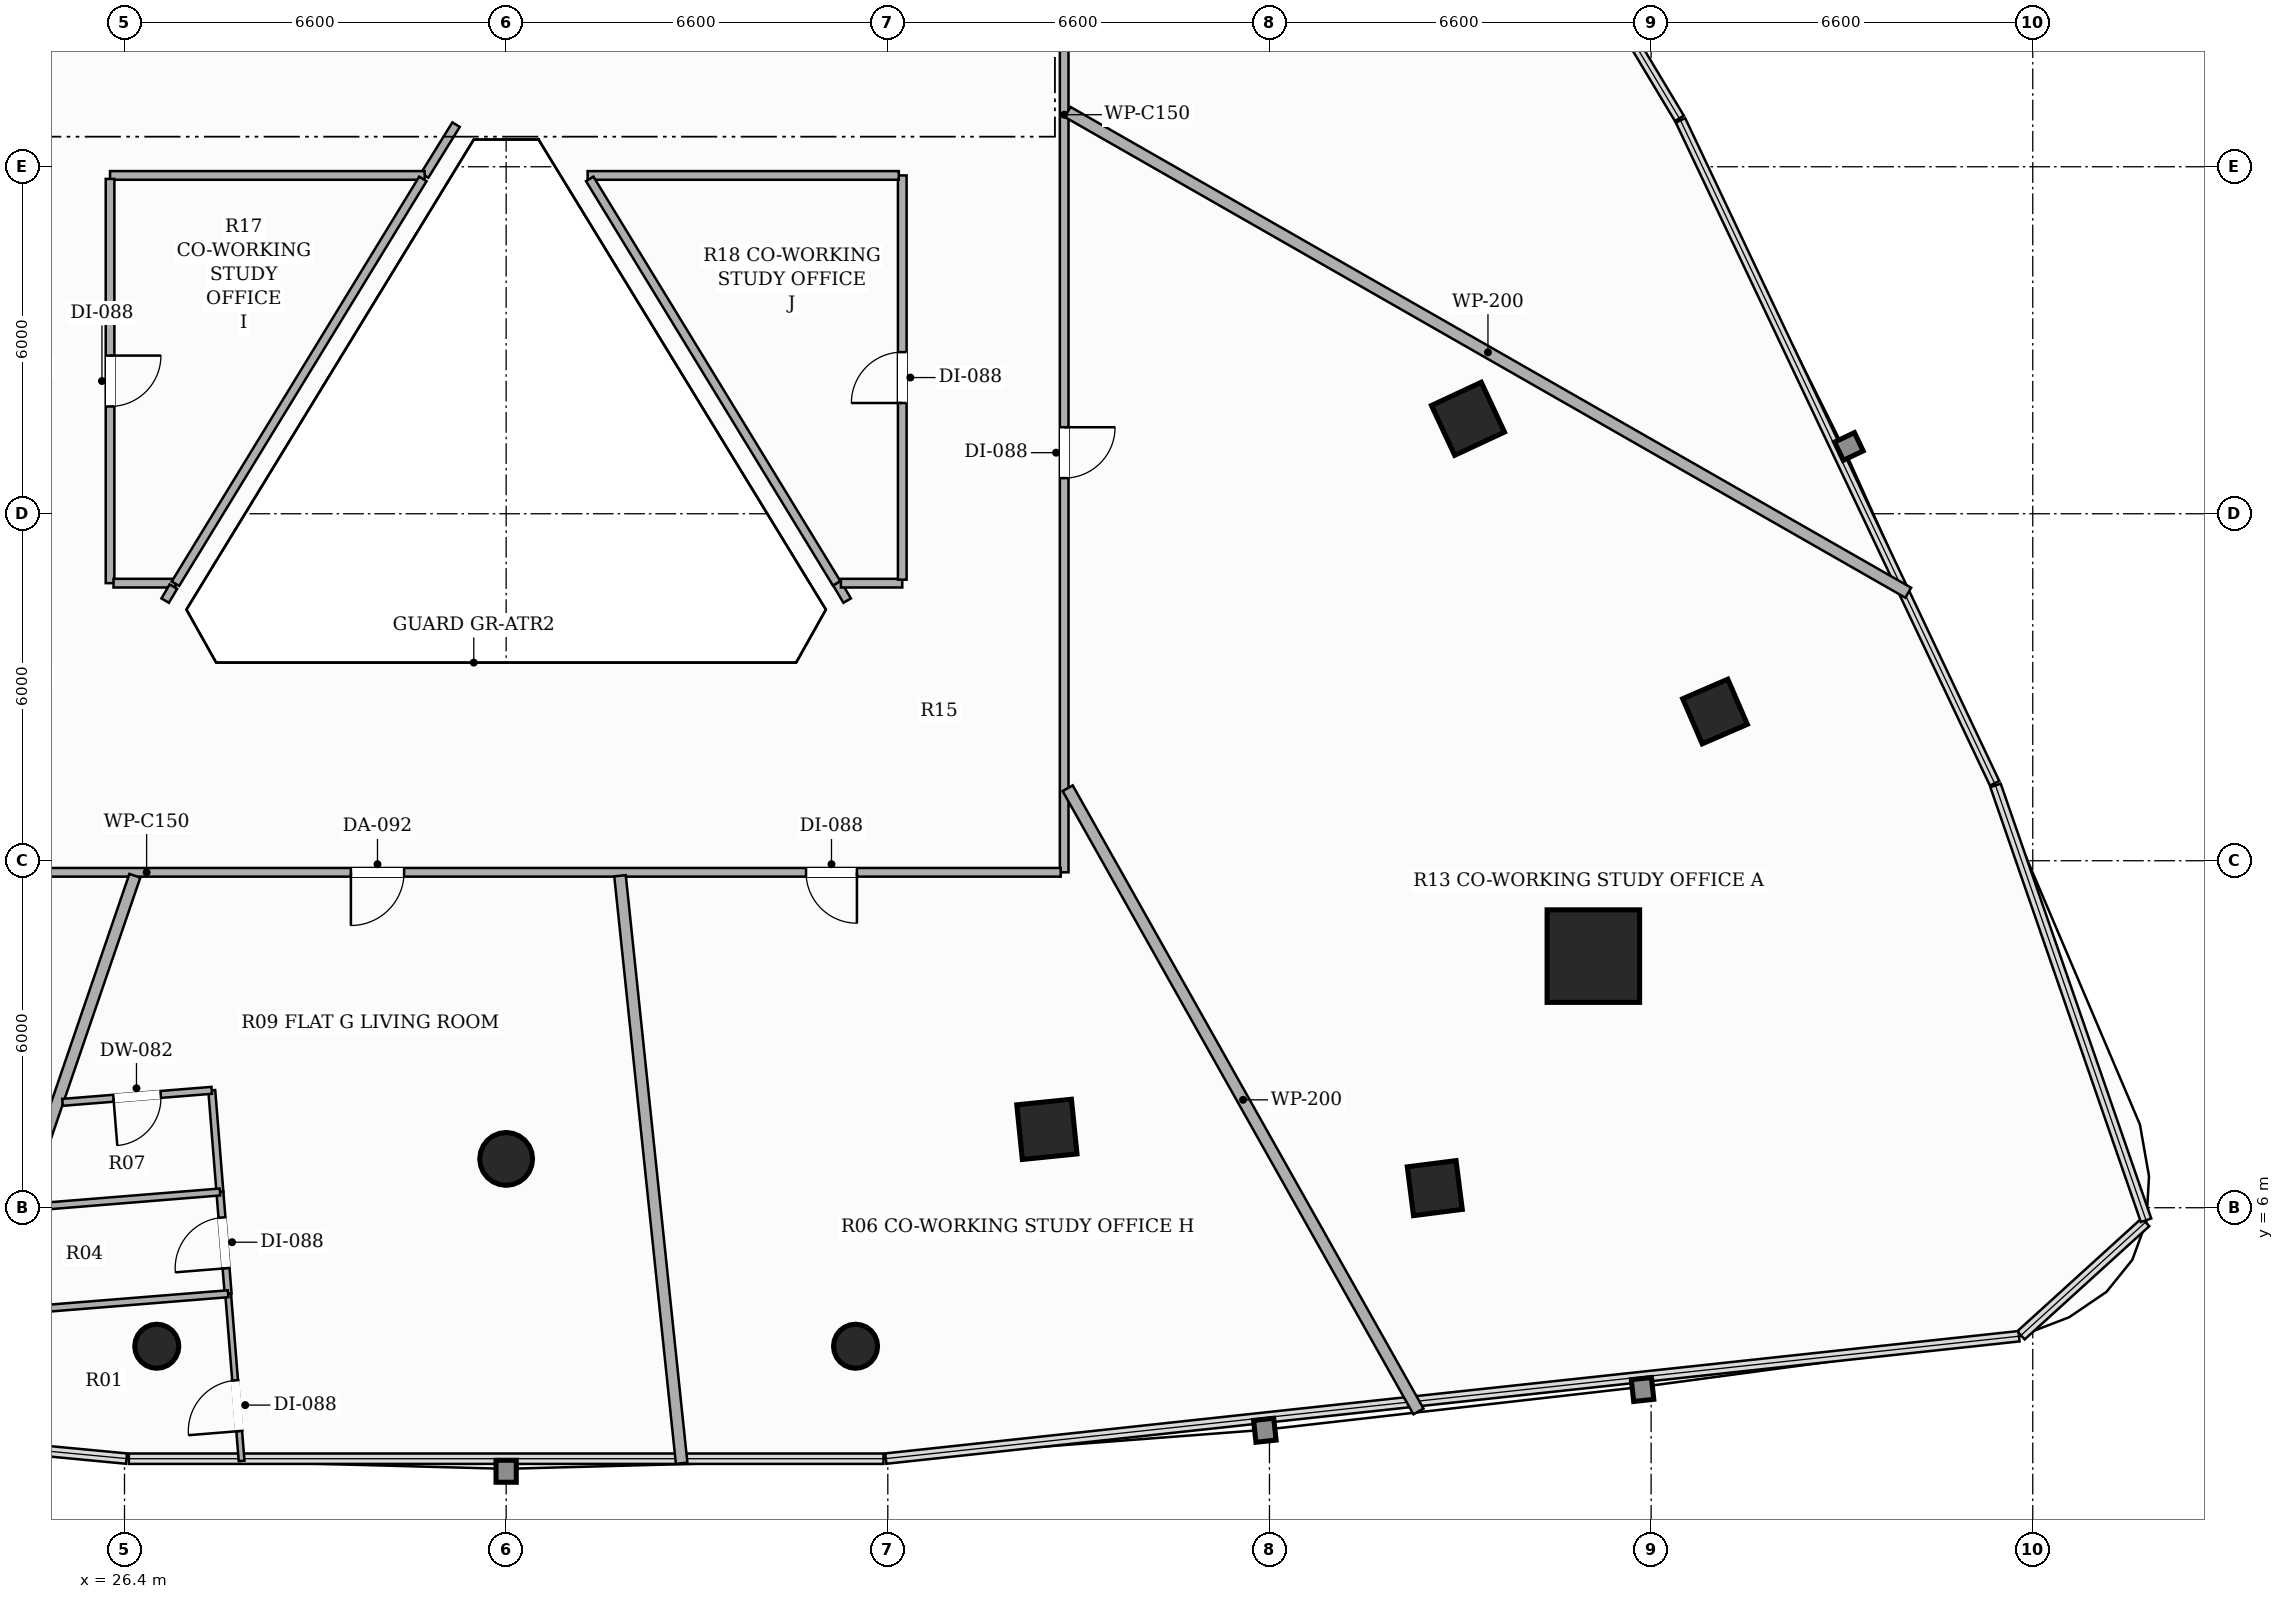
"""IFC4 building model, lengths in metres.
Left out: names, types, materials, properties, quantities, classifications, styles, units other than length and angle.
Written with IfcOpenShell. Run it as: python <this file> out.ifc"""

import sys

from ifc_helpers import new_model, si_unit, direction, frame, frame_2d, origin, origin_2d, place, context, subcontext, project, spatial, rectangle, hollow_rectangle, hollow_circle, extrude, element, fill, save


model = new_model("IFC4")
c1 = context("Model", 3, precision=1e-05, world=origin(), true_north=direction((0.0, 1.0)))
c2 = subcontext(c1, "Body", "Model", "MODEL_VIEW")
j1 = project(units=[si_unit("LENGTHUNIT", "METRE"), si_unit("PLANEANGLEUNIT", "RADIAN")], contexts=[c1])
p1 = place(None, origin())
s1 = spatial("IfcSite", under=j1, at=p1, CompositionType="ELEMENT")
p2 = place(p1, origin())
s2 = spatial("IfcBuilding", under=s1, at=p2, CompositionType="ELEMENT")
p3 = place(p2, frame((0.0, 0.0, 53.3)))
s3 = spatial("IfcBuildingStorey", under=s2, at=p3, CompositionType="ELEMENT", Elevation=53.3)
p4 = place(p3, frame((51.801, 10.351, 0.0), z_axis=(0.0, 0.0, 1.0), x_axis=(1.0, 0.0, 0.0)))
e1 = element("IfcColumn", 1, at=p4, inside=s3, PredefinedType="COLUMN", context=c2, shape_type="SweptSolid", body=[
    extrude(hollow_rectangle(XDim=1.6, YDim=1.6, WallThickness=0.05, at=origin_2d()), origin(), (0.0, 0.0, 1.0), 3.3),
])
p5 = place(p3, frame((33.0, 6.844, 0.0), z_axis=(0.0, 0.0, 1.0), x_axis=(1.0, 0.0, 0.0)))
e2 = element("IfcColumn", 2, at=p5, inside=s3, PredefinedType="COLUMN", context=c2, shape_type="SweptSolid", body=[
    extrude(hollow_circle(Radius=0.457, WallThickness=0.025, at=origin_2d()), origin(), (0.0, 0.0, 1.0), 3.3),
])
for number, where, z_axis, x_axis in (
    (3, (42.351, 7.355, 0.0), (0.0, 0.0, 1.0), (0.995, 0.101, 0.0)),
    (4, (49.633, 19.642, 0.0), (0.0, 0.0, 1.0), (-0.423, 0.906, 0.0)),
):
    element("IfcColumn", number, at=place(p3, frame(where, z_axis=z_axis, x_axis=x_axis)), inside=s3, PredefinedType="COLUMN", context=c2, shape_type="SweptSolid", body=[
        extrude(hollow_rectangle(XDim=0.95, YDim=0.95, WallThickness=0.032, at=origin_2d()), origin(), (0.0, 0.0, 1.0), 3.3),
    ])
for number, where, z_axis, x_axis in (
    (5, (49.059, 6.339, 0.0), (0.0, 0.0, 1.0), (0.992, 0.127, 0.0)),
    (6, (53.905, 14.58, 0.0), (0.0, 0.0, 1.0), (-0.397, 0.918, 0.0)),
):
    element("IfcColumn", number, at=place(p3, frame(where, z_axis=z_axis, x_axis=x_axis)), inside=s3, PredefinedType="COLUMN", context=c2, shape_type="SweptSolid", body=[
        extrude(hollow_rectangle(XDim=0.85, YDim=0.85, WallThickness=0.028, at=origin_2d()), origin(), (0.0, 0.0, 1.0), 3.3),
    ])
for number, where, z_axis, x_axis in (
    (7, (26.958, 3.605, 0.0), (0.0, 0.0, 1.0), (1.0, 0.0, 0.0)),
    (8, (39.042, 3.605, 0.0), (0.0, 0.0, 1.0), (1.0, 0.0, 0.0)),
):
    element("IfcColumn", number, at=place(p3, frame(where, z_axis=z_axis, x_axis=x_axis)), inside=s3, PredefinedType="COLUMN", context=c2, shape_type="SweptSolid", body=[
        extrude(hollow_circle(Radius=0.381, WallThickness=0.022, at=origin_2d()), origin(), (0.0, 0.0, 1.0), 3.3),
    ])
p6 = place(p3, frame((42.65, 36.84, 0.0), z_axis=(0.0, 0.0, 1.0), x_axis=(0.0, -1.0, 0.0)))
e9 = element("IfcWall", 9, at=p6, inside=s3, PredefinedType="PARTITIONING", context=c2, shape_type="SweptSolid", body=[
    extrude(rectangle(XDim=25.04, YDim=0.15, at=frame_2d((12.52, 0.0))), origin(), (0.0, 0.0, 1.0), 2.413),
])
p7 = place(p6, frame((17.344, 0.0, 0.0)))
e10 = element("IfcOpeningElement", 10, at=p7, cuts=e9, PredefinedType="OPENING", context=c2, shape_type="SweptSolid", body=[
    extrude(rectangle(XDim=0.88, YDim=2.1, at=frame_2d((0.44, 1.05))), frame((0.0, 0.085, 0.0), z_axis=(0.0, -1.0, 0.0), x_axis=(1.0, 0.0, 0.0)), (0.0, 0.0, 1.0), 0.17),
])
p8 = place(p6, frame((5.656, 0.0, 0.0)))
e11 = element("IfcOpeningElement", 11, at=p8, cuts=e9, PredefinedType="OPENING", context=c2, shape_type="SweptSolid", body=[
    extrude(rectangle(XDim=0.88, YDim=2.1, at=frame_2d((0.44, 1.05))), frame((0.0, 0.085, 0.0), z_axis=(0.0, -1.0, 0.0), x_axis=(1.0, 0.0, 0.0)), (0.0, 0.0, 1.0), 0.17),
])
p9 = place(p3, frame((42.59, 11.8, 0.0), z_axis=(0.0, 0.0, 1.0), x_axis=(-1.0, 0.0, 0.0)))
e12 = element("IfcWall", 12, at=p9, inside=s3, PredefinedType="PARTITIONING", context=c2, shape_type="SweptSolid", body=[
    extrude(rectangle(XDim=19.24, YDim=0.15, at=frame_2d((9.62, 0.0))), origin(), (0.0, 0.0, 1.0), 2.669),
])
p10 = place(p9, frame((11.355, 0.0, 0.0)))
e13 = element("IfcOpeningElement", 13, at=p10, cuts=e12, PredefinedType="OPENING", context=c2, shape_type="SweptSolid", body=[
    extrude(rectangle(XDim=0.92, YDim=2.15, at=frame_2d((0.46, 1.075))), frame((0.0, 0.085, 0.0), z_axis=(0.0, -1.0, 0.0), x_axis=(1.0, 0.0, 0.0)), (0.0, 0.0, 1.0), 0.17),
])
p11 = place(p9, frame((3.524, 0.0, 0.0)))
e14 = element("IfcOpeningElement", 14, at=p11, cuts=e12, PredefinedType="OPENING", context=c2, shape_type="SweptSolid", body=[
    extrude(rectangle(XDim=0.88, YDim=2.1, at=frame_2d((0.44, 1.05))), frame((0.0, 0.085, 0.0), z_axis=(0.0, -1.0, 0.0), x_axis=(1.0, 0.0, 0.0)), (0.0, 0.0, 1.0), 0.17),
])
p12 = place(p3, frame((32.134, 24.728, 0.0), z_axis=(0.0, 0.0, 1.0), x_axis=(-0.525996314714, -0.850486846993, 0.0)))
e15 = element("IfcWall", 15, at=p12, inside=s3, PredefinedType="PARTITIONING", context=c2, shape_type="SweptSolid", body=[
    extrude(rectangle(XDim=1.032, YDim=0.15, at=frame_2d((0.516, 0.0))), origin(), (0.0, 0.0, 1.0), 3.06),
])
p13 = place(p3, frame((31.591, 23.85, 0.0), z_axis=(0.0, 0.0, 1.0), x_axis=(-1.0, 0.0, 0.0)))
e16 = element("IfcWall", 16, at=p13, inside=s3, PredefinedType="PARTITIONING", context=c2, shape_type="SweptSolid", body=[
    extrude(rectangle(XDim=5.441, YDim=0.15, at=frame_2d((2.721, 0.0))), origin(), (0.0, 0.0, 1.0), 2.669),
])
p14 = place(p3, frame((26.15, 23.79, 0.0), z_axis=(0.0, 0.0, 1.0), x_axis=(0.0, -1.0, 0.0)))
e17 = element("IfcWall", 17, at=p14, inside=s3, PredefinedType="PARTITIONING", context=c2, shape_type="SweptSolid", body=[
    extrude(rectangle(XDim=6.99, YDim=0.15, at=frame_2d((3.495, 0.0))), origin(), (0.0, 0.0, 1.0), 2.669),
])
p15 = place(p14, frame((3.055, 0.0, 0.0)))
e18 = element("IfcOpeningElement", 18, at=p15, cuts=e17, PredefinedType="OPENING", context=c2, shape_type="SweptSolid", body=[
    extrude(rectangle(XDim=0.88, YDim=2.1, at=frame_2d((0.44, 1.05))), frame((0.0, 0.085, 0.0), z_axis=(0.0, -1.0, 0.0), x_axis=(1.0, 0.0, 0.0)), (0.0, 0.0, 1.0), 0.17),
])
p16 = place(p3, frame((26.21, 16.8, 0.0), z_axis=(0.0, 0.0, 1.0), x_axis=(1.0, 0.0, 0.0)))
e19 = element("IfcWall", 19, at=p16, inside=s3, PredefinedType="PARTITIONING", context=c2, shape_type="SweptSolid", body=[
    extrude(rectangle(XDim=1.071, YDim=0.15, at=frame_2d((0.536, 0.0))), origin(), (0.0, 0.0, 1.0), 3.06),
])
p17 = place(p3, frame((27.246, 16.74, 0.0), z_axis=(0.0, 0.0, 1.0), x_axis=(-0.508992658084, -0.860770860344, 0.0)))
e20 = element("IfcWall", 20, at=p17, inside=s3, PredefinedType="PARTITIONING", context=c2, shape_type="SweptSolid", body=[
    extrude(rectangle(XDim=0.281, YDim=0.15, at=frame_2d((0.141, 0.0))), origin(), (0.0, 0.0, 1.0), 3.06),
])
p18 = place(p3, frame((38.897, 16.498, 0.0), z_axis=(0.0, 0.0, 1.0), x_axis=(-0.507720001023, 0.861522141654, 0.0)))
e21 = element("IfcWall", 21, at=p18, inside=s3, PredefinedType="PARTITIONING", context=c2, shape_type="SweptSolid", body=[
    extrude(rectangle(XDim=0.351, YDim=0.15, at=frame_2d((0.175, 0.0))), origin(), (0.0, 0.0, 1.0), 3.06),
])
p19 = place(p3, frame((38.789, 16.8, 0.0), z_axis=(0.0, 0.0, 1.0), x_axis=(1.0, 0.0, 0.0)))
e22 = element("IfcWall", 22, at=p19, inside=s3, PredefinedType="PARTITIONING", context=c2, shape_type="SweptSolid", body=[
    extrude(rectangle(XDim=1.061, YDim=0.15, at=frame_2d((0.531, 0.0))), origin(), (0.0, 0.0, 1.0), 3.06),
])
p20 = place(p3, frame((39.85, 16.86, 0.0), z_axis=(0.0, 0.0, 1.0), x_axis=(0.0, 1.0, 0.0)))
e23 = element("IfcWall", 23, at=p20, inside=s3, PredefinedType="PARTITIONING", context=c2, shape_type="SweptSolid", body=[
    extrude(rectangle(XDim=6.99, YDim=0.15, at=frame_2d((3.495, 0.0))), origin(), (0.0, 0.0, 1.0), 2.669),
])
p21 = place(p20, frame((3.055, 0.0, 0.0)))
e24 = element("IfcOpeningElement", 24, at=p21, cuts=e23, PredefinedType="OPENING", context=c2, shape_type="SweptSolid", body=[
    extrude(rectangle(XDim=0.88, YDim=2.1, at=frame_2d((0.44, 1.05))), frame((0.0, 0.085, 0.0), z_axis=(0.0, -1.0, 0.0), x_axis=(1.0, 0.0, 0.0)), (0.0, 0.0, 1.0), 0.17),
])
p22 = place(p3, frame((39.79, 23.85, 0.0), z_axis=(0.0, 0.0, 1.0), x_axis=(-1.0, 0.0, 0.0)))
e25 = element("IfcWall", 25, at=p22, inside=s3, PredefinedType="PARTITIONING", context=c2, shape_type="SweptSolid", body=[
    extrude(rectangle(XDim=5.381, YDim=0.15, at=frame_2d((2.69, 0.0))), origin(), (0.0, 0.0, 1.0), 2.669),
])
p23 = place(p3, frame((27.281, 16.79, 0.0), z_axis=(0.0, 0.0, 1.0), x_axis=(0.521563150989, 0.8532126813, 0.0)))
e26 = element("IfcWall", 26, at=p23, inside=s3, PredefinedType="PARTITIONING", context=c2, shape_type="SweptSolid", body=[
    extrude(rectangle(XDim=8.204, YDim=0.15, at=frame_2d((4.102, 0.0))), origin(), (0.0, 0.0, 1.0), 2.669),
])
p24 = place(p3, frame((34.445, 23.79, 0.0), z_axis=(0.0, 0.0, 1.0), x_axis=(0.521145044988, -0.853468125992, 0.0)))
e27 = element("IfcWall", 27, at=p24, inside=s3, PredefinedType="PARTITIONING", context=c2, shape_type="SweptSolid", body=[
    extrude(rectangle(XDim=8.194, YDim=0.15, at=frame_2d((4.097, 0.0))), origin(), (0.0, 0.0, 1.0), 2.669),
])
p25 = place(p3, frame((42.71, 24.947, 0.0), z_axis=(0.0, 0.0, 1.0), x_axis=(0.868086992596, -0.49641210026, 0.0)))
e28 = element("IfcWall", 28, at=p25, inside=s3, PredefinedType="PARTITIONING", context=c2, shape_type="SweptSolid", body=[
    extrude(rectangle(XDim=16.746, YDim=0.2, at=frame_2d((8.373, 0.0))), origin(), (0.0, 0.0, 1.0), 2.413),
])
p26 = place(p3, frame((48.777, 2.477, 0.0), z_axis=(0.0, 0.0, 1.0), x_axis=(-0.490577996894, 0.871397285377, 0.0)))
e29 = element("IfcWall", 29, at=p26, inside=s3, PredefinedType="PARTITIONING", context=c2, shape_type="SweptSolid", body=[
    extrude(rectangle(XDim=12.367, YDim=0.2, at=frame_2d((6.184, 0.0))), origin(), (0.0, 0.0, 1.0), 2.413),
])
p27 = place(p3, frame((26.579, 11.74, 0.0), z_axis=(0.0, 0.0, 1.0), x_axis=(-0.32385337678, -0.946107282684, 0.0)))
e30 = element("IfcWall", 30, at=p27, inside=s3, PredefinedType="PARTITIONING", context=c2, shape_type="SweptSolid", body=[
    extrude(rectangle(XDim=10.378, YDim=0.2, at=frame_2d((5.189, 0.0))), origin(), (0.0, 0.0, 1.0), 2.413),
])
p28 = place(p3, frame((34.969, 11.74, 0.0), z_axis=(0.0, 0.0, 1.0), x_axis=(0.10435134466, -0.994540495338, 0.0)))
e31 = element("IfcWall", 31, at=p28, inside=s3, PredefinedType="PARTITIONING", context=c2, shape_type="SweptSolid", body=[
    extrude(rectangle(XDim=10.215, YDim=0.2, at=frame_2d((5.107, 0.0))), origin(), (0.0, 0.0, 1.0), 2.413),
])
p29 = place(p3, frame((28.05, 6.272, 0.0), z_axis=(0.0, 0.0, 1.0), x_axis=(-0.080009304194, 0.996794116778, 0.0)))
e32 = element("IfcWall", 32, at=p29, inside=s3, PredefinedType="PARTITIONING", context=c2, shape_type="SweptSolid", body=[
    extrude(rectangle(XDim=1.764, YDim=0.12, at=frame_2d((0.882, 0.0))), origin(), (0.0, 0.0, 1.0), 3.06),
])
p30 = place(p3, frame((27.909, 8.03, 0.0), z_axis=(0.0, 0.0, 1.0), x_axis=(-0.996768339954, -0.080329798112, 0.0)))
e33 = element("IfcWall", 33, at=p30, inside=s3, PredefinedType="PARTITIONING", context=c2, shape_type="SweptSolid", body=[
    extrude(rectangle(XDim=2.589, YDim=0.12, at=frame_2d((1.295, 0.0))), origin(), (0.0, 0.0, 1.0), 3.06),
])
p31 = place(p30, frame((0.885, 0.0, 0.0)))
e34 = element("IfcOpeningElement", 34, at=p31, cuts=e33, PredefinedType="OPENING", context=c2, shape_type="SweptSolid", body=[
    extrude(rectangle(XDim=0.82, YDim=2.1, at=frame_2d((0.41, 1.05))), frame((0.0, 0.07, 0.0), z_axis=(0.0, -1.0, 0.0), x_axis=(1.0, 0.0, 0.0)), (0.0, 0.0, 1.0), 0.14),
])
p32 = place(p3, frame((28.192, 4.513, 0.0), z_axis=(0.0, 0.0, 1.0), x_axis=(-0.080377539135, 0.996764491343, 0.0)))
e35 = element("IfcWall", 35, at=p32, inside=s3, PredefinedType="PARTITIONING", context=c2, shape_type="SweptSolid", body=[
    extrude(rectangle(XDim=1.765, YDim=0.12, at=frame_2d((0.882, 0.0))), origin(), (0.0, 0.0, 1.0), 2.413),
])
p33 = place(p32, frame((0.442, 0.0, 0.0)))
e36 = element("IfcOpeningElement", 36, at=p33, cuts=e35, PredefinedType="OPENING", context=c2, shape_type="SweptSolid", body=[
    extrude(rectangle(XDim=0.88, YDim=2.1, at=frame_2d((0.44, 1.05))), frame((0.0, 0.07, 0.0), z_axis=(0.0, -1.0, 0.0), x_axis=(1.0, 0.0, 0.0)), (0.0, 0.0, 1.0), 0.14),
])
p34 = place(p3, frame((28.425, 1.622, 0.0), z_axis=(0.0, 0.0, 1.0), x_axis=(-0.080390934681, 0.996763411057, 0.0)))
e37 = element("IfcWall", 37, at=p34, inside=s3, PredefinedType="PARTITIONING", context=c2, shape_type="SweptSolid", body=[
    extrude(rectangle(XDim=2.9, YDim=0.1, at=frame_2d((1.45, 0.0))), origin(), (0.0, 0.0, 1.0), 2.413),
])
p35 = place(p34, frame((0.517, 0.0, 0.0)))
e38 = element("IfcOpeningElement", 38, at=p35, cuts=e37, PredefinedType="OPENING", context=c2, shape_type="SweptSolid", body=[
    extrude(rectangle(XDim=0.88, YDim=2.1, at=frame_2d((0.44, 1.05))), frame((0.0, 0.06, 0.0), z_axis=(0.0, -1.0, 0.0), x_axis=(1.0, 0.0, 0.0)), (0.0, 0.0, 1.0), 0.12),
])
p36 = place(p3, frame((28.05, 6.272, 0.0), z_axis=(0.0, 0.0, 1.0), x_axis=(-0.99675765278, -0.080462299392, 0.0)))
e39 = element("IfcWall", 39, at=p36, inside=s3, PredefinedType="PARTITIONING", context=c2, shape_type="SweptSolid", body=[
    extrude(rectangle(XDim=3.356, YDim=0.12, at=frame_2d((1.678, 0.0))), origin(), (0.0, 0.0, 1.0), 2.413),
])
p37 = place(p3, frame((28.192, 4.513, 0.0), z_axis=(0.0, 0.0, 1.0), x_axis=(-0.996771449714, -0.080291201486, 0.0)))
e40 = element("IfcWall", 40, at=p37, inside=s3, PredefinedType="PARTITIONING", context=c2, shape_type="SweptSolid", body=[
    extrude(rectangle(XDim=4.123, YDim=0.12, at=frame_2d((2.062, 0.0))), origin(), (0.0, 0.0, 1.0), 2.413),
])
p38 = place(p7, origin())
e41 = element("IfcDoor", 41, at=p38, inside=s3, OperationType="SINGLE_SWING_LEFT", PredefinedType="DOOR", context=c2, shape_type="SweptSolid", body=[
    extrude(rectangle(XDim=0.88, YDim=2.1, at=frame_2d((0.44, 1.05))), frame((0.0, 0.025, 0.0), z_axis=(0.0, -1.0, 0.0), x_axis=(1.0, 0.0, 0.0)), (0.0, 0.0, 1.0), 0.05),
])
fill(e10, e41)
p39 = place(p10, origin())
e42 = element("IfcDoor", 42, at=p39, inside=s3, OperationType="SINGLE_SWING_RIGHT", PredefinedType="DOOR", context=c2, shape_type="SweptSolid", body=[
    extrude(rectangle(XDim=0.92, YDim=2.15, at=frame_2d((0.46, 1.075))), frame((0.0, 0.025, 0.0), z_axis=(0.0, -1.0, 0.0), x_axis=(1.0, 0.0, 0.0)), (0.0, 0.0, 1.0), 0.05),
])
fill(e13, e42)
p40 = place(p31, origin())
e43 = element("IfcDoor", 43, at=p40, inside=s3, OperationType="SINGLE_SWING_RIGHT", PredefinedType="DOOR", context=c2, shape_type="SweptSolid", body=[
    extrude(rectangle(XDim=0.82, YDim=2.1, at=frame_2d((0.41, 1.05))), frame((0.0, 0.025, 0.0), z_axis=(0.0, -1.0, 0.0), x_axis=(1.0, 0.0, 0.0)), (0.0, 0.0, 1.0), 0.05),
])
fill(e34, e43)
p41 = place(p33, origin())
e44 = element("IfcDoor", 44, at=p41, inside=s3, OperationType="SINGLE_SWING_LEFT", PredefinedType="DOOR", context=c2, shape_type="SweptSolid", body=[
    extrude(rectangle(XDim=0.88, YDim=2.1, at=frame_2d((0.44, 1.05))), frame((0.0, 0.025, 0.0), z_axis=(0.0, -1.0, 0.0), x_axis=(1.0, 0.0, 0.0)), (0.0, 0.0, 1.0), 0.05),
])
fill(e36, e44)
p42 = place(p35, origin())
e45 = element("IfcDoor", 45, at=p42, inside=s3, OperationType="SINGLE_SWING_LEFT", PredefinedType="DOOR", context=c2, shape_type="SweptSolid", body=[
    extrude(rectangle(XDim=0.88, YDim=2.1, at=frame_2d((0.44, 1.05))), frame((0.0, 0.025, 0.0), z_axis=(0.0, -1.0, 0.0), x_axis=(1.0, 0.0, 0.0)), (0.0, 0.0, 1.0), 0.05),
])
fill(e38, e45)
p43 = place(p11, origin())
e46 = element("IfcDoor", 46, at=p43, inside=s3, OperationType="SINGLE_SWING_LEFT", PredefinedType="DOOR", context=c2, shape_type="SweptSolid", body=[
    extrude(rectangle(XDim=0.88, YDim=2.1, at=frame_2d((0.44, 1.05))), frame((0.0, 0.025, 0.0), z_axis=(0.0, -1.0, 0.0), x_axis=(1.0, 0.0, 0.0)), (0.0, 0.0, 1.0), 0.05),
])
fill(e14, e46)
p44 = place(p15, origin())
e47 = element("IfcDoor", 47, at=p44, inside=s3, OperationType="SINGLE_SWING_LEFT", PredefinedType="DOOR", context=c2, shape_type="SweptSolid", body=[
    extrude(rectangle(XDim=0.88, YDim=2.1, at=frame_2d((0.44, 1.05))), frame((0.0, 0.025, 0.0), z_axis=(0.0, -1.0, 0.0), x_axis=(1.0, 0.0, 0.0)), (0.0, 0.0, 1.0), 0.05),
])
fill(e18, e47)
p45 = place(p21, origin())
e48 = element("IfcDoor", 48, at=p45, inside=s3, OperationType="SINGLE_SWING_LEFT", PredefinedType="DOOR", context=c2, shape_type="SweptSolid", body=[
    extrude(rectangle(XDim=0.88, YDim=2.1, at=frame_2d((0.44, 1.05))), frame((0.0, 0.025, 0.0), z_axis=(0.0, -1.0, 0.0), x_axis=(1.0, 0.0, 0.0)), (0.0, 0.0, 1.0), 0.05),
])
fill(e24, e48)
save(model, sys.argv[1])
